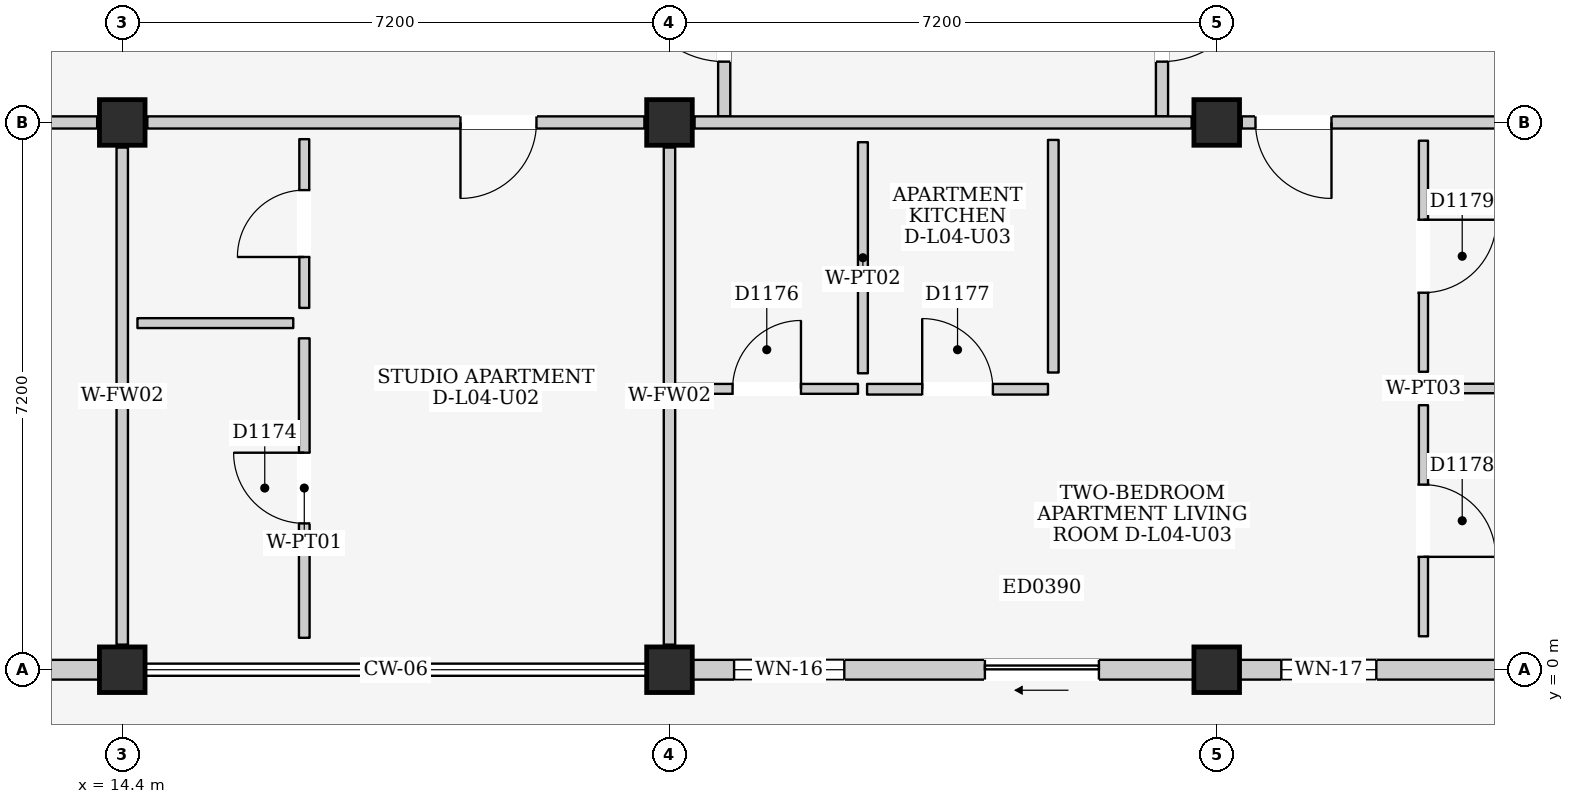
"""IFC4 building model, lengths in metres.
Left out: names, types, materials, properties, quantities, classifications, styles, units other than length and angle.
Written with IfcOpenShell. Run it as: python <this file> out.ifc"""

import sys

from ifc_helpers import new_model, si_unit, direction, frame, frame_2d, origin, origin_2d, place, context, subcontext, project, spatial, rectangle, extrude, element, fill, save


model = new_model("IFC4")
c1 = context("Model", 3, precision=1e-05, world=origin(), true_north=direction((0.0, 1.0)))
c2 = subcontext(c1, "Body", "Model", "MODEL_VIEW")
j1 = project(units=[si_unit("LENGTHUNIT", "METRE"), si_unit("PLANEANGLEUNIT", "RADIAN")], contexts=[c1])
p1 = place(None, origin())
s1 = spatial("IfcSite", under=j1, at=p1, CompositionType="ELEMENT")
p2 = place(p1, origin())
s2 = spatial("IfcBuilding", under=s1, at=p2, CompositionType="ELEMENT")
p3 = place(p2, frame((0.0, 0.0, 15.4)))
s3 = spatial("IfcBuildingStorey", under=s2, at=p3, CompositionType="ELEMENT", Elevation=15.4)
for number, where, z_axis, x_axis in (
    (1, (14.4, 0.0, 0.0), (0.0, 0.0, 1.0), (1.0, 0.0, 0.0)),
    (2, (14.4, 7.2, 0.0), (0.0, 0.0, 1.0), (1.0, 0.0, 0.0)),
    (3, (21.6, 0.0, 0.0), (0.0, 0.0, 1.0), (1.0, 0.0, 0.0)),
    (4, (21.6, 7.2, 0.0), (0.0, 0.0, 1.0), (1.0, 0.0, 0.0)),
    (5, (28.8, 0.0, 0.0), (0.0, 0.0, 1.0), (1.0, 0.0, 0.0)),
    (6, (28.8, 7.2, 0.0), (0.0, 0.0, 1.0), (1.0, 0.0, 0.0)),
):
    element("IfcColumn", number, at=place(p3, frame(where, z_axis=z_axis, x_axis=x_axis)), inside=s3, PredefinedType="COLUMN", context=c2, shape_type="SweptSolid", body=[
        extrude(rectangle(XDim=0.6, YDim=0.6, at=origin_2d()), origin(), (0.0, 0.0, 1.0), 3.2),
    ])
p4 = place(p3, frame((7.5, 0.0, 0.0), z_axis=(0.0, 0.0, 1.0), x_axis=(1.0, 0.0, 0.0)))
e7 = element("IfcWall", 7, at=p4, inside=s3, PredefinedType="ELEMENTEDWALL", context=c2, shape_type="SweptSolid", body=[
    extrude(rectangle(XDim=6.6, YDim=0.26, at=frame_2d((3.3, 0.0))), origin(), (0.0, 0.0, 1.0), 2.43),
])
p5 = place(p4, frame((3.85, 0.0, 0.0)))
e8 = element("IfcOpeningElement", 8, at=p5, cuts=e7, PredefinedType="OPENING", context=c2, shape_type="SweptSolid", body=[
    extrude(rectangle(XDim=1.8, YDim=2.12, at=frame_2d((0.9, 1.06))), frame((0.0, 0.145, 0.0), z_axis=(0.0, -1.0, 0.0), x_axis=(1.0, 0.0, 0.0)), (0.0, 0.0, 1.0), 0.29),
])
p6 = place(p4, frame((0.55, 0.0, 0.81)))
e9 = element("IfcOpeningElement", 9, at=p6, cuts=e7, PredefinedType="OPENING", context=c2, shape_type="SweptSolid", body=[
    extrude(rectangle(XDim=1.35, YDim=1.5, at=frame_2d((0.675, 0.75))), frame((0.0, 0.145, 0.0), z_axis=(0.0, -1.0, 0.0), x_axis=(1.0, 0.0, 0.0)), (0.0, 0.0, 1.0), 0.29),
])
p7 = place(p3, frame((21.9, 0.0, 0.0), z_axis=(0.0, 0.0, 1.0), x_axis=(1.0, 0.0, 0.0)))
e10 = element("IfcWall", 10, at=p7, inside=s3, PredefinedType="ELEMENTEDWALL", context=c2, shape_type="SweptSolid", body=[
    extrude(rectangle(XDim=6.6, YDim=0.26, at=frame_2d((3.3, 0.0))), origin(), (0.0, 0.0, 1.0), 2.43),
])
p8 = place(p7, frame((3.85, 0.0, 0.0)))
e11 = element("IfcOpeningElement", 11, at=p8, cuts=e10, PredefinedType="OPENING", context=c2, shape_type="SweptSolid", body=[
    extrude(rectangle(XDim=1.5, YDim=2.12, at=frame_2d((0.75, 1.06))), frame((0.0, 0.145, 0.0), z_axis=(0.0, -1.0, 0.0), x_axis=(1.0, 0.0, 0.0)), (0.0, 0.0, 1.0), 0.29),
])
p9 = place(p7, frame((0.55, 0.0, 0.9)))
e12 = element("IfcOpeningElement", 12, at=p9, cuts=e10, PredefinedType="OPENING", context=c2, shape_type="SweptSolid", body=[
    extrude(rectangle(XDim=1.45, YDim=1.4, at=frame_2d((0.725, 0.7))), frame((0.0, 0.145, 0.0), z_axis=(0.0, -1.0, 0.0), x_axis=(1.0, 0.0, 0.0)), (0.0, 0.0, 1.0), 0.29),
])
p10 = place(p3, frame((29.1, 0.0, 0.0), z_axis=(0.0, 0.0, 1.0), x_axis=(1.0, 0.0, 0.0)))
e13 = element("IfcWall", 13, at=p10, inside=s3, PredefinedType="ELEMENTEDWALL", context=c2, shape_type="SweptSolid", body=[
    extrude(rectangle(XDim=6.6, YDim=0.26, at=frame_2d((3.3, 0.0))), origin(), (0.0, 0.0, 1.0), 2.43),
])
p11 = place(p10, frame((3.85, 0.0, 0.0)))
e14 = element("IfcOpeningElement", 14, at=p11, cuts=e13, PredefinedType="OPENING", context=c2, shape_type="SweptSolid", body=[
    extrude(rectangle(XDim=2.4, YDim=2.12, at=frame_2d((1.2, 1.06))), frame((0.0, 0.145, 0.0), z_axis=(0.0, -1.0, 0.0), x_axis=(1.0, 0.0, 0.0)), (0.0, 0.0, 1.0), 0.29),
])
p12 = place(p10, frame((0.55, 0.0, 0.9)))
e15 = element("IfcOpeningElement", 15, at=p12, cuts=e13, PredefinedType="OPENING", context=c2, shape_type="SweptSolid", body=[
    extrude(rectangle(XDim=1.25, YDim=1.3, at=frame_2d((0.625, 0.65))), frame((0.0, 0.145, 0.0), z_axis=(0.0, -1.0, 0.0), x_axis=(1.0, 0.0, 0.0)), (0.0, 0.0, 1.0), 0.29),
])
p13 = place(p3, frame((22.32, 7.28, 0.0), z_axis=(0.0, 0.0, 1.0), x_axis=(0.0, 1.0, 0.0)))
e16 = element("IfcWall", 16, at=p13, inside=s3, PredefinedType="PARTITIONING", context=c2, shape_type="SweptSolid", body=[
    extrude(rectangle(XDim=4.32, YDim=0.16, at=frame_2d((2.16, 0.0))), origin(), (0.0, 0.0, 1.0), 2.95),
])
p14 = place(p13, frame((0.72, 0.0, 0.0)))
e17 = element("IfcOpeningElement", 17, at=p14, cuts=e16, PredefinedType="OPENING", context=c2, shape_type="SweptSolid", body=[
    extrude(rectangle(XDim=1.2, YDim=2.2, at=frame_2d((0.6, 1.1))), frame((0.0, 0.095, 0.0), z_axis=(0.0, -1.0, 0.0), x_axis=(1.0, 0.0, 0.0)), (0.0, 0.0, 1.0), 0.19),
])
p15 = place(p3, frame((28.08, 7.28, 0.0), z_axis=(0.0, 0.0, 1.0), x_axis=(0.0, 1.0, 0.0)))
e18 = element("IfcWall", 18, at=p15, inside=s3, PredefinedType="PARTITIONING", context=c2, shape_type="SweptSolid", body=[
    extrude(rectangle(XDim=4.32, YDim=0.16, at=frame_2d((2.16, 0.0))), origin(), (0.0, 0.0, 1.0), 2.95),
])
p16 = place(p15, frame((0.72, 0.0, 0.0)))
e19 = element("IfcOpeningElement", 19, at=p16, cuts=e18, PredefinedType="OPENING", context=c2, shape_type="SweptSolid", body=[
    extrude(rectangle(XDim=1.2, YDim=2.2, at=frame_2d((0.6, 1.1))), frame((0.0, 0.095, 0.0), z_axis=(0.0, -1.0, 0.0), x_axis=(1.0, 0.0, 0.0)), (0.0, 0.0, 1.0), 0.19),
])
p17 = place(p3, frame((7.53, 7.2, 0.0), z_axis=(0.0, 0.0, 1.0), x_axis=(1.0, 0.0, 0.0)))
e20 = element("IfcWall", 20, at=p17, inside=s3, PredefinedType="PARTITIONING", context=c2, shape_type="SweptSolid", body=[
    extrude(rectangle(XDim=6.54, YDim=0.16, at=frame_2d((3.27, 0.0))), origin(), (0.0, 0.0, 1.0), 2.335),
])
p18 = place(p3, frame((14.4, 0.33, 0.0), z_axis=(0.0, 0.0, 1.0), x_axis=(0.0, 1.0, 0.0)))
e21 = element("IfcWall", 21, at=p18, inside=s3, PredefinedType="PARTITIONING", context=c2, shape_type="SweptSolid", body=[
    extrude(rectangle(XDim=6.54, YDim=0.15, at=frame_2d((3.27, 0.0))), origin(), (0.0, 0.0, 1.0), 2.385),
])
p19 = place(p3, frame((14.73, 7.2, 0.0), z_axis=(0.0, 0.0, 1.0), x_axis=(1.0, 0.0, 0.0)))
e22 = element("IfcWall", 22, at=p19, inside=s3, PredefinedType="PARTITIONING", context=c2, shape_type="SweptSolid", body=[
    extrude(rectangle(XDim=6.54, YDim=0.16, at=frame_2d((3.27, 0.0))), origin(), (0.0, 0.0, 1.0), 2.335),
])
p20 = place(p19, frame((4.12, 0.0, 0.0)))
e23 = element("IfcOpeningElement", 23, at=p20, cuts=e22, PredefinedType="OPENING", context=c2, shape_type="SweptSolid", body=[
    extrude(rectangle(XDim=1.0, YDim=2.15, at=frame_2d((0.5, 1.075))), frame((0.0, 0.095, 0.0), z_axis=(0.0, -1.0, 0.0), x_axis=(1.0, 0.0, 0.0)), (0.0, 0.0, 1.0), 0.19),
])
p21 = place(p3, frame((21.6, 0.33, 0.0), z_axis=(0.0, 0.0, 1.0), x_axis=(0.0, 1.0, 0.0)))
e24 = element("IfcWall", 24, at=p21, inside=s3, PredefinedType="PARTITIONING", context=c2, shape_type="SweptSolid", body=[
    extrude(rectangle(XDim=6.54, YDim=0.15, at=frame_2d((3.27, 0.0))), origin(), (0.0, 0.0, 1.0), 2.385),
])
p22 = place(p3, frame((14.6, 4.56, 0.0), z_axis=(0.0, 0.0, 1.0), x_axis=(1.0, 0.0, 0.0)))
e25 = element("IfcWall", 25, at=p22, inside=s3, PredefinedType="PARTITIONING", context=c2, shape_type="SweptSolid", body=[
    extrude(rectangle(XDim=2.05, YDim=0.13, at=frame_2d((1.025, 0.0))), origin(), (0.0, 0.0, 1.0), 2.95),
])
p23 = place(p3, frame((16.795, 4.76, 0.0), z_axis=(0.0, 0.0, 1.0), x_axis=(0.0, 1.0, 0.0)))
e26 = element("IfcWall", 26, at=p23, inside=s3, PredefinedType="PARTITIONING", context=c2, shape_type="SweptSolid", body=[
    extrude(rectangle(XDim=2.22, YDim=0.13, at=frame_2d((1.11, 0.0))), origin(), (0.0, 0.0, 1.0), 2.95),
])
p24 = place(p23, frame((0.67, 0.0, 0.0)))
e27 = element("IfcOpeningElement", 27, at=p24, cuts=e26, PredefinedType="OPENING", context=c2, shape_type="SweptSolid", body=[
    extrude(rectangle(XDim=0.88, YDim=2.1, at=frame_2d((0.44, 1.05))), frame((0.0, 0.08, 0.0), z_axis=(0.0, -1.0, 0.0), x_axis=(1.0, 0.0, 0.0)), (0.0, 0.0, 1.0), 0.16),
])
p25 = place(p3, frame((16.795, 0.42, 0.0), z_axis=(0.0, 0.0, 1.0), x_axis=(0.0, 1.0, 0.0)))
e28 = element("IfcWall", 28, at=p25, inside=s3, PredefinedType="PARTITIONING", context=c2, shape_type="SweptSolid", body=[
    extrude(rectangle(XDim=3.94, YDim=0.14, at=frame_2d((1.97, 0.0))), origin(), (0.0, 0.0, 1.0), 2.95),
])
p26 = place(p25, frame((1.505, 0.0, 0.0)))
e29 = element("IfcOpeningElement", 29, at=p26, cuts=e28, PredefinedType="OPENING", context=c2, shape_type="SweptSolid", body=[
    extrude(rectangle(XDim=0.93, YDim=2.14, at=frame_2d((0.465, 1.07))), frame((0.0, 0.085, 0.0), z_axis=(0.0, -1.0, 0.0), x_axis=(1.0, 0.0, 0.0)), (0.0, 0.0, 1.0), 0.17),
])
p27 = place(p3, frame((21.93, 7.2, 0.0), z_axis=(0.0, 0.0, 1.0), x_axis=(1.0, 0.0, 0.0)))
e30 = element("IfcWall", 30, at=p27, inside=s3, PredefinedType="PARTITIONING", context=c2, shape_type="SweptSolid", body=[
    extrude(rectangle(XDim=6.54, YDim=0.16, at=frame_2d((3.27, 0.0))), origin(), (0.0, 0.0, 1.0), 2.335),
])
p28 = place(p3, frame((29.13, 7.2, 0.0), z_axis=(0.0, 0.0, 1.0), x_axis=(1.0, 0.0, 0.0)))
e31 = element("IfcWall", 31, at=p28, inside=s3, PredefinedType="PARTITIONING", context=c2, shape_type="SweptSolid", body=[
    extrude(rectangle(XDim=6.54, YDim=0.16, at=frame_2d((3.27, 0.0))), origin(), (0.0, 0.0, 1.0), 2.335),
])
p29 = place(p28, frame((0.18, 0.0, 0.0)))
e32 = element("IfcOpeningElement", 32, at=p29, cuts=e31, PredefinedType="OPENING", context=c2, shape_type="SweptSolid", body=[
    extrude(rectangle(XDim=1.0, YDim=2.15, at=frame_2d((0.5, 1.075))), frame((0.0, 0.095, 0.0), z_axis=(0.0, -1.0, 0.0), x_axis=(1.0, 0.0, 0.0)), (0.0, 0.0, 1.0), 0.19),
])
p30 = place(p3, frame((21.68, 3.695, 0.0), z_axis=(0.0, 0.0, 1.0), x_axis=(1.0, 0.0, 0.0)))
e33 = element("IfcWall", 33, at=p30, inside=s3, PredefinedType="PARTITIONING", context=c2, shape_type="SweptSolid", body=[
    extrude(rectangle(XDim=2.4, YDim=0.13, at=frame_2d((1.2, 0.0))), origin(), (0.0, 0.0, 1.0), 2.95),
])
p31 = place(p30, frame((0.75, 0.0, 0.0)))
e34 = element("IfcOpeningElement", 34, at=p31, cuts=e33, PredefinedType="OPENING", context=c2, shape_type="SweptSolid", body=[
    extrude(rectangle(XDim=0.9, YDim=2.1, at=frame_2d((0.45, 1.05))), frame((0.0, 0.08, 0.0), z_axis=(0.0, -1.0, 0.0), x_axis=(1.0, 0.0, 0.0)), (0.0, 0.0, 1.0), 0.16),
])
p32 = place(p3, frame((24.145, 3.9, 0.0), z_axis=(0.0, 0.0, 1.0), x_axis=(0.0, 1.0, 0.0)))
e35 = element("IfcWall", 35, at=p32, inside=s3, PredefinedType="PARTITIONING", context=c2, shape_type="SweptSolid", body=[
    extrude(rectangle(XDim=3.04, YDim=0.13, at=frame_2d((1.52, 0.0))), origin(), (0.0, 0.0, 1.0), 2.95),
])
p33 = place(p3, frame((24.2, 3.69, 0.0), z_axis=(0.0, 0.0, 1.0), x_axis=(1.0, 0.0, 0.0)))
e36 = element("IfcWall", 36, at=p33, inside=s3, PredefinedType="PARTITIONING", context=c2, shape_type="SweptSolid", body=[
    extrude(rectangle(XDim=2.38, YDim=0.14, at=frame_2d((1.19, 0.0))), origin(), (0.0, 0.0, 1.0), 2.95),
])
p34 = place(p33, frame((0.725, 0.0, 0.0)))
e37 = element("IfcOpeningElement", 37, at=p34, cuts=e36, PredefinedType="OPENING", context=c2, shape_type="SweptSolid", body=[
    extrude(rectangle(XDim=0.93, YDim=2.14, at=frame_2d((0.465, 1.07))), frame((0.0, 0.085, 0.0), z_axis=(0.0, -1.0, 0.0), x_axis=(1.0, 0.0, 0.0)), (0.0, 0.0, 1.0), 0.17),
])
p35 = place(p3, frame((26.65, 3.91, 0.0), z_axis=(0.0, 0.0, 1.0), x_axis=(0.0, 1.0, 0.0)))
e38 = element("IfcWall", 38, at=p35, inside=s3, PredefinedType="PARTITIONING", context=c2, shape_type="SweptSolid", body=[
    extrude(rectangle(XDim=3.06, YDim=0.14, at=frame_2d((1.53, 0.0))), origin(), (0.0, 0.0, 1.0), 2.95),
])
p36 = place(p3, frame((31.52, 0.44, 0.0), z_axis=(0.0, 0.0, 1.0), x_axis=(0.0, 1.0, 0.0)))
e39 = element("IfcWall", 39, at=p36, inside=s3, PredefinedType="PARTITIONING", context=c2, shape_type="SweptSolid", body=[
    extrude(rectangle(XDim=3.04, YDim=0.12, at=frame_2d((1.52, 0.0))), origin(), (0.0, 0.0, 1.0), 2.95),
])
p37 = place(p36, frame((1.045, 0.0, 0.0)))
e40 = element("IfcOpeningElement", 40, at=p37, cuts=e39, PredefinedType="OPENING", context=c2, shape_type="SweptSolid", body=[
    extrude(rectangle(XDim=0.95, YDim=2.15, at=frame_2d((0.475, 1.075))), frame((0.0, 0.075, 0.0), z_axis=(0.0, -1.0, 0.0), x_axis=(1.0, 0.0, 0.0)), (0.0, 0.0, 1.0), 0.15),
])
p38 = place(p3, frame((31.72, 3.7, 0.0), z_axis=(0.0, 0.0, 1.0), x_axis=(1.0, 0.0, 0.0)))
e41 = element("IfcWall", 41, at=p38, inside=s3, PredefinedType="PARTITIONING", context=c2, shape_type="SweptSolid", body=[
    extrude(rectangle(XDim=4.06, YDim=0.125, at=frame_2d((2.03, 0.0))), origin(), (0.0, 0.0, 1.0), 2.95),
])
p39 = place(p3, frame((31.52, 3.92, 0.0), z_axis=(0.0, 0.0, 1.0), x_axis=(0.0, 1.0, 0.0)))
e42 = element("IfcWall", 42, at=p39, inside=s3, PredefinedType="PARTITIONING", context=c2, shape_type="SweptSolid", body=[
    extrude(rectangle(XDim=3.04, YDim=0.12, at=frame_2d((1.52, 0.0))), origin(), (0.0, 0.0, 1.0), 2.95),
])
p40 = place(p39, frame((1.04, 0.0, 0.0)))
e43 = element("IfcOpeningElement", 43, at=p40, cuts=e42, PredefinedType="OPENING", context=c2, shape_type="SweptSolid", body=[
    extrude(rectangle(XDim=0.96, YDim=2.15, at=frame_2d((0.48, 1.075))), frame((0.0, 0.075, 0.0), z_axis=(0.0, -1.0, 0.0), x_axis=(1.0, 0.0, 0.0)), (0.0, 0.0, 1.0), 0.15),
])
p41 = place(p8, frame((1.5, 0.0, 0.0), z_axis=(0.0, 0.0, 1.0), x_axis=(-1.0, 0.0, 0.0)))
e44 = element("IfcDoor", 44, at=p41, inside=s3, OperationType="SLIDING_TO_LEFT", PredefinedType="DOOR", context=c2, shape_type="SweptSolid", body=[
    extrude(rectangle(XDim=1.5, YDim=2.12, at=frame_2d((0.75, 1.06))), frame((0.0, 0.025, 0.0), z_axis=(0.0, -1.0, 0.0), x_axis=(1.0, 0.0, 0.0)), (0.0, 0.0, 1.0), 0.05),
])
fill(e11, e44)
p42 = place(p9, origin())
e45 = element("IfcWindow", 45, at=p42, inside=s3, PartitioningType="DOUBLE_PANEL_VERTICAL", PredefinedType="WINDOW", context=c2, shape_type="SweptSolid", body=[
    extrude(rectangle(XDim=1.45, YDim=1.4, at=frame_2d((0.725, 0.7))), frame((0.0, 0.03, 0.0), z_axis=(0.0, -1.0, 0.0), x_axis=(1.0, 0.0, 0.0)), (0.0, 0.0, 1.0), 0.06),
])
fill(e12, e45)
p43 = place(p12, origin())
e46 = element("IfcWindow", 46, at=p43, inside=s3, PartitioningType="SINGLE_PANEL", PredefinedType="WINDOW", context=c2, shape_type="SweptSolid", body=[
    extrude(rectangle(XDim=1.25, YDim=1.3, at=frame_2d((0.625, 0.65))), frame((0.0, 0.03, 0.0), z_axis=(0.0, -1.0, 0.0), x_axis=(1.0, 0.0, 0.0)), (0.0, 0.0, 1.0), 0.06),
])
fill(e15, e46)
p44 = place(p14, origin())
e47 = element("IfcDoor", 47, at=p44, inside=s3, OperationType="SINGLE_SWING_RIGHT", PredefinedType="DOOR", context=c2, shape_type="SweptSolid", body=[
    extrude(rectangle(XDim=1.2, YDim=2.2, at=frame_2d((0.6, 1.1))), frame((0.0, 0.025, 0.0), z_axis=(0.0, -1.0, 0.0), x_axis=(1.0, 0.0, 0.0)), (0.0, 0.0, 1.0), 0.05),
])
fill(e17, e47)
p45 = place(p16, frame((1.2, 0.0, 0.0), z_axis=(0.0, 0.0, 1.0), x_axis=(-1.0, 0.0, 0.0)))
e48 = element("IfcDoor", 48, at=p45, inside=s3, OperationType="SINGLE_SWING_LEFT", PredefinedType="DOOR", context=c2, shape_type="SweptSolid", body=[
    extrude(rectangle(XDim=1.2, YDim=2.2, at=frame_2d((0.6, 1.1))), frame((0.0, 0.025, 0.0), z_axis=(0.0, -1.0, 0.0), x_axis=(1.0, 0.0, 0.0)), (0.0, 0.0, 1.0), 0.05),
])
fill(e19, e48)
p46 = place(p20, frame((1.0, 0.0, 0.0), z_axis=(0.0, 0.0, 1.0), x_axis=(-1.0, 0.0, 0.0)))
e49 = element("IfcDoor", 49, at=p46, inside=s3, OperationType="SINGLE_SWING_RIGHT", PredefinedType="DOOR", context=c2, shape_type="SweptSolid", body=[
    extrude(rectangle(XDim=1.0, YDim=2.15, at=frame_2d((0.5, 1.075))), frame((0.0, 0.025, 0.0), z_axis=(0.0, -1.0, 0.0), x_axis=(1.0, 0.0, 0.0)), (0.0, 0.0, 1.0), 0.05),
])
fill(e23, e49)
p47 = place(p24, origin())
e50 = element("IfcDoor", 50, at=p47, inside=s3, OperationType="SINGLE_SWING_LEFT", PredefinedType="DOOR", context=c2, shape_type="SweptSolid", body=[
    extrude(rectangle(XDim=0.88, YDim=2.1, at=frame_2d((0.44, 1.05))), frame((0.0, 0.025, 0.0), z_axis=(0.0, -1.0, 0.0), x_axis=(1.0, 0.0, 0.0)), (0.0, 0.0, 1.0), 0.05),
])
fill(e27, e50)
p48 = place(p26, origin())
e51 = element("IfcDoor", 51, at=p48, inside=s3, OperationType="SINGLE_SWING_RIGHT", PredefinedType="DOOR", context=c2, shape_type="SweptSolid", body=[
    extrude(rectangle(XDim=0.93, YDim=2.14, at=frame_2d((0.465, 1.07))), frame((0.0, 0.025, 0.0), z_axis=(0.0, -1.0, 0.0), x_axis=(1.0, 0.0, 0.0)), (0.0, 0.0, 1.0), 0.05),
])
fill(e29, e51)
p49 = place(p29, frame((1.0, 0.0, 0.0), z_axis=(0.0, 0.0, 1.0), x_axis=(-1.0, 0.0, 0.0)))
e52 = element("IfcDoor", 52, at=p49, inside=s3, OperationType="SINGLE_SWING_LEFT", PredefinedType="DOOR", context=c2, shape_type="SweptSolid", body=[
    extrude(rectangle(XDim=1.0, YDim=2.15, at=frame_2d((0.5, 1.075))), frame((0.0, 0.025, 0.0), z_axis=(0.0, -1.0, 0.0), x_axis=(1.0, 0.0, 0.0)), (0.0, 0.0, 1.0), 0.05),
])
fill(e32, e52)
p50 = place(p31, origin())
e53 = element("IfcDoor", 53, at=p50, inside=s3, OperationType="SINGLE_SWING_RIGHT", PredefinedType="DOOR", context=c2, shape_type="SweptSolid", body=[
    extrude(rectangle(XDim=0.9, YDim=2.1, at=frame_2d((0.45, 1.05))), frame((0.0, 0.025, 0.0), z_axis=(0.0, -1.0, 0.0), x_axis=(1.0, 0.0, 0.0)), (0.0, 0.0, 1.0), 0.05),
])
fill(e34, e53)
p51 = place(p34, origin())
e54 = element("IfcDoor", 54, at=p51, inside=s3, OperationType="SINGLE_SWING_LEFT", PredefinedType="DOOR", context=c2, shape_type="SweptSolid", body=[
    extrude(rectangle(XDim=0.93, YDim=2.14, at=frame_2d((0.465, 1.07))), frame((0.0, 0.025, 0.0), z_axis=(0.0, -1.0, 0.0), x_axis=(1.0, 0.0, 0.0)), (0.0, 0.0, 1.0), 0.05),
])
fill(e37, e54)
p52 = place(p37, frame((0.95, 0.0, 0.0), z_axis=(0.0, 0.0, 1.0), x_axis=(-1.0, 0.0, 0.0)))
e55 = element("IfcDoor", 55, at=p52, inside=s3, OperationType="SINGLE_SWING_RIGHT", PredefinedType="DOOR", context=c2, shape_type="SweptSolid", body=[
    extrude(rectangle(XDim=0.95, YDim=2.15, at=frame_2d((0.475, 1.075))), frame((0.0, 0.025, 0.0), z_axis=(0.0, -1.0, 0.0), x_axis=(1.0, 0.0, 0.0)), (0.0, 0.0, 1.0), 0.05),
])
fill(e40, e55)
p53 = place(p40, frame((0.96, 0.0, 0.0), z_axis=(0.0, 0.0, 1.0), x_axis=(-1.0, 0.0, 0.0)))
e56 = element("IfcDoor", 56, at=p53, inside=s3, OperationType="SINGLE_SWING_LEFT", PredefinedType="DOOR", context=c2, shape_type="SweptSolid", body=[
    extrude(rectangle(XDim=0.96, YDim=2.15, at=frame_2d((0.48, 1.075))), frame((0.0, 0.025, 0.0), z_axis=(0.0, -1.0, 0.0), x_axis=(1.0, 0.0, 0.0)), (0.0, 0.0, 1.0), 0.05),
])
fill(e43, e56)
save(model, sys.argv[1])
